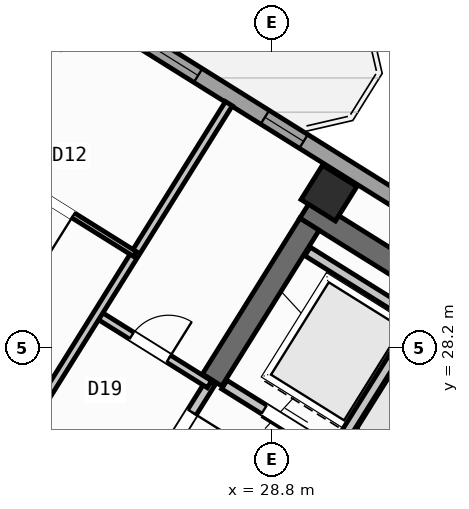
"""IFC4 building model, lengths in metres.
Left out: names, types, materials, properties, quantities, classifications, styles, units other than length and angle.
Written with IfcOpenShell. Run it as: python <this file> out.ifc"""

import sys

from ifc_helpers import new_model, si_unit, direction, frame, frame_2d, origin, origin_2d, place, context, subcontext, project, spatial, rectangle, hollow_rectangle, extrude, source, transform, mapped, element, fill, save


model = new_model("IFC4")
c1 = context("Model", 3, precision=1e-05, world=origin(), true_north=direction((0.0, 1.0)))
c2 = subcontext(c1, "Body", "Model", "MODEL_VIEW")
j1 = project(units=[si_unit("LENGTHUNIT", "METRE"), si_unit("PLANEANGLEUNIT", "RADIAN")], contexts=[c1])
p1 = place(None, origin())
s1 = spatial("IfcSite", under=j1, at=p1, CompositionType="ELEMENT")
p2 = place(p1, origin())
s2 = spatial("IfcBuilding", under=s1, at=p2, CompositionType="ELEMENT")
p3 = place(p2, frame((0.0, 0.0, 242.1)))
s3 = spatial("IfcBuildingStorey", under=s2, at=p3, CompositionType="ELEMENT", Elevation=242.1)
p4 = place(p3, frame((40.531, 24.036, 0.0), z_axis=(0.0, 0.0, 1.0), x_axis=(-0.848048787466, 0.529918157905, 0.0)))
e1 = element("IfcWall", 1, at=p4, inside=s3, PredefinedType="SHEAR", context=c2, shape_type="SweptSolid", body=[
    extrude(rectangle(XDim=13.04, YDim=0.45, at=frame_2d((6.52, 0.0))), origin(), (0.0, 0.0, 1.0), 3.32),
])
p5 = place(p3, frame((29.544, 30.636, 0.0), z_axis=(0.0, 0.0, 1.0), x_axis=(-0.529902075036, -0.848058836916, 0.0)))
e2 = element("IfcWall", 2, at=p5, inside=s3, PredefinedType="SHEAR", context=c2, shape_type="SweptSolid", body=[
    extrude(rectangle(XDim=3.625, YDim=0.45, at=frame_2d((1.812, 0.0))), origin(), (0.0, 0.0, 1.0), 3.32),
])
m1 = source(origin(), c2, "Body", "SweptSolid", [
    extrude(hollow_rectangle(XDim=0.8, YDim=0.8, WallThickness=0.032, at=origin_2d()), origin(), (0.0, 0.0, 1.0), 3.6),
])
p6 = place(p3, frame((29.928, 31.251, 0.0), z_axis=(0.0, 0.0, 1.0), x_axis=(-0.848048096156, 0.529919264233, 0.0)))
e3 = element("IfcColumn", 3, at=p6, inside=s3, PredefinedType="COLUMN", context=c2, shape_type="MappedRepresentation", body=[
    mapped(m1, transform((0.0, 0.0, 0.0), scale=1.0)),
])
p7 = place(p3, frame((14.138, 41.825, 0.0), z_axis=(0.0, 0.0, 1.0), x_axis=(0.848046498049, -0.529921821731, 0.0)))
e4 = element("IfcWall", 4, at=p7, inside=s3, PredefinedType="STANDARD", context=c2, shape_type="SweptSolid", body=[
    extrude(rectangle(XDim=31.588, YDim=0.32, at=frame_2d((15.794, 0.0))), origin(), (0.0, 0.0, 1.0), 3.32),
])
p8 = place(p7, frame((9.712, 0.0, 0.0)))
e5 = element("IfcOpeningElement", 5, at=p8, cuts=e4, PredefinedType="OPENING", context=c2, shape_type="SweptSolid", body=[
    extrude(rectangle(XDim=1.05, YDim=2.15, at=frame_2d((0.525, 1.075))), frame((0.0, 0.17, 0.0), z_axis=(0.0, -1.0, 0.0), x_axis=(1.0, 0.0, 0.0)), (0.0, 0.0, 1.0), 0.34),
])
p9 = place(p7, frame((0.841, 0.0, 0.9)))
e6 = element("IfcOpeningElement", 6, at=p9, cuts=e4, PredefinedType="OPENING", context=c2, shape_type="SweptSolid", body=[
    extrude(rectangle(XDim=1.65, YDim=1.45, at=frame_2d((0.825, 0.725))), frame((0.0, 0.17, 0.0), z_axis=(0.0, -1.0, 0.0), x_axis=(1.0, 0.0, 0.0)), (0.0, 0.0, 1.0), 0.34),
])
p10 = place(p7, frame((4.171, 0.0, 1.0)))
e7 = element("IfcOpeningElement", 7, at=p10, cuts=e4, PredefinedType="OPENING", context=c2, shape_type="SweptSolid", body=[
    extrude(rectangle(XDim=0.9, YDim=1.25, at=frame_2d((0.45, 0.625))), frame((0.0, 0.17, 0.0), z_axis=(0.0, -1.0, 0.0), x_axis=(1.0, 0.0, 0.0)), (0.0, 0.0, 1.0), 0.34),
])
p11 = place(p7, frame((13.624, 0.0, 0.95)))
e8 = element("IfcOpeningElement", 8, at=p11, cuts=e4, PredefinedType="OPENING", context=c2, shape_type="SweptSolid", body=[
    extrude(rectangle(XDim=1.95, YDim=1.35, at=frame_2d((0.975, 0.675))), frame((0.0, 0.17, 0.0), z_axis=(0.0, -1.0, 0.0), x_axis=(1.0, 0.0, 0.0)), (0.0, 0.0, 1.0), 0.34),
])
p12 = place(p7, frame((17.129, 0.0, 1.0)))
e9 = element("IfcOpeningElement", 9, at=p12, cuts=e4, PredefinedType="OPENING", context=c2, shape_type="SweptSolid", body=[
    extrude(rectangle(XDim=0.9, YDim=1.25, at=frame_2d((0.45, 0.625))), frame((0.0, 0.17, 0.0), z_axis=(0.0, -1.0, 0.0), x_axis=(1.0, 0.0, 0.0)), (0.0, 0.0, 1.0), 0.34),
])
p13 = place(p7, frame((21.744, 0.0, 0.9)))
e10 = element("IfcOpeningElement", 10, at=p13, cuts=e4, PredefinedType="OPENING", context=c2, shape_type="SweptSolid", body=[
    extrude(rectangle(XDim=1.65, YDim=1.45, at=frame_2d((0.825, 0.725))), frame((0.0, 0.17, 0.0), z_axis=(0.0, -1.0, 0.0), x_axis=(1.0, 0.0, 0.0)), (0.0, 0.0, 1.0), 0.34),
])
p14 = place(p7, frame((27.394, 0.0, 0.9)))
e11 = element("IfcOpeningElement", 11, at=p14, cuts=e4, PredefinedType="OPENING", context=c2, shape_type="SweptSolid", body=[
    extrude(rectangle(XDim=1.65, YDim=1.45, at=frame_2d((0.825, 0.725))), frame((0.0, 0.17, 0.0), z_axis=(0.0, -1.0, 0.0), x_axis=(1.0, 0.0, 0.0)), (0.0, 0.0, 1.0), 0.34),
])
p15 = place(p3, frame((31.822, 24.998, 0.0), z_axis=(0.0, 0.0, 1.0), x_axis=(-0.848054125777, 0.529909614701, 0.0)))
e12 = element("IfcWall", 12, at=p15, inside=s3, PredefinedType="STANDARD", context=c2, shape_type="SweptSolid", body=[
    extrude(rectangle(XDim=4.668, YDim=0.2, at=frame_2d((2.334, 0.0))), origin(), (0.0, 0.0, 1.0), 3.31),
])
p16 = place(p15, frame((0.52, 0.0, 0.0)))
e13 = element("IfcOpeningElement", 13, at=p16, cuts=e12, PredefinedType="OPENING", context=c2, shape_type="SweptSolid", body=[
    extrude(rectangle(XDim=1.2, YDim=2.15, at=frame_2d((0.6, 1.075))), frame((0.0, 0.11, 0.0), z_axis=(0.0, -1.0, 0.0), x_axis=(1.0, 0.0, 0.0)), (0.0, 0.0, 1.0), 0.22),
])
p17 = place(p15, frame((2.54, 0.0, 0.0)))
e14 = element("IfcOpeningElement", 14, at=p17, cuts=e12, PredefinedType="OPENING", context=c2, shape_type="SweptSolid", body=[
    extrude(rectangle(XDim=1.2, YDim=2.15, at=frame_2d((0.6, 1.075))), frame((0.0, 0.11, 0.0), z_axis=(0.0, -1.0, 0.0), x_axis=(1.0, 0.0, 0.0)), (0.0, 0.0, 1.0), 0.22),
])
p18 = place(p3, frame((31.645, 28.716, 0.0), z_axis=(0.0, 0.0, 1.0), x_axis=(-0.52986693015, -0.848080795876, 0.0)))
e15 = element("IfcWall", 15, at=p18, inside=s3, PredefinedType="STANDARD", context=c2, shape_type="SweptSolid", body=[
    extrude(rectangle(XDim=2.66, YDim=0.2, at=frame_2d((1.33, 0.0))), origin(), (0.0, 0.0, 1.0), 3.31),
])
p19 = place(p3, frame((33.363, 27.69, 0.0), z_axis=(0.0, 0.0, 1.0), x_axis=(-0.84804957148, 0.529916903215, 0.0)))
e16 = element("IfcWall", 16, at=p19, inside=s3, PredefinedType="STANDARD", context=c2, shape_type="SweptSolid", body=[
    extrude(rectangle(XDim=4.548, YDim=0.2, at=frame_2d((2.274, 0.0))), origin(), (0.0, 0.0, 1.0), 3.31),
])
p20 = place(p3, frame((27.596, 27.52, 0.0), z_axis=(0.0, 0.0, 1.0), x_axis=(-0.529865479138, -0.848081702443, 0.0)))
e17 = element("IfcWall", 17, at=p20, inside=s3, PredefinedType="STANDARD", context=c2, shape_type="SweptSolid", body=[
    extrude(rectangle(XDim=2.96, YDim=0.2, at=frame_2d((1.48, 0.0))), origin(), (0.0, 0.0, 1.0), 3.31),
])
p21 = place(p20, frame((0.7, 0.0, 0.0)))
e18 = element("IfcOpeningElement", 18, at=p21, cuts=e17, PredefinedType="OPENING", context=c2, shape_type="SweptSolid", body=[
    extrude(rectangle(XDim=1.5, YDim=2.15, at=frame_2d((0.75, 1.075))), frame((0.0, 0.11, 0.0), z_axis=(0.0, -1.0, 0.0), x_axis=(1.0, 0.0, 0.0)), (0.0, 0.0, 1.0), 0.22),
])
p22 = place(p3, frame((27.57, 27.478, 0.0), z_axis=(0.0, 0.0, 1.0), x_axis=(-0.848050851465, 0.529914854792, 0.0)))
e19 = element("IfcWall", 19, at=p22, inside=s3, PredefinedType="PARTITIONING", context=c2, shape_type="SweptSolid", body=[
    extrude(rectangle(XDim=2.61, YDim=0.16, at=frame_2d((1.305, 0.0))), origin(), (0.0, 0.0, 1.0), 3.31),
])
p23 = place(p22, frame((0.95, 0.0, 0.0)))
e20 = element("IfcOpeningElement", 20, at=p23, cuts=e19, PredefinedType="OPENING", context=c2, shape_type="SweptSolid", body=[
    extrude(rectangle(XDim=0.86, YDim=2.05, at=frame_2d((0.43, 1.025))), frame((0.0, 0.09, 0.0), z_axis=(0.0, -1.0, 0.0), x_axis=(1.0, 0.0, 0.0)), (0.0, 0.0, 1.0), 0.18),
])
p24 = place(p3, frame((27.953, 33.016, 0.0), z_axis=(0.0, 0.0, 1.0), x_axis=(-0.529903001606, -0.848058257957, 0.0)))
e21 = element("IfcWall", 21, at=p24, inside=s3, PredefinedType="PARTITIONING", context=c2, shape_type="SweptSolid", body=[
    extrude(rectangle(XDim=9.15, YDim=0.16, at=frame_2d((4.575, 0.0))), origin(), (0.0, 0.0, 1.0), 3.31),
])
p25 = place(p3, frame((26.099, 30.05, 0.0), z_axis=(0.0, 0.0, 1.0), x_axis=(-0.84803087207, 0.529946827537, 0.0)))
e22 = element("IfcWall", 22, at=p25, inside=s3, PredefinedType="PARTITIONING", context=c2, shape_type="SweptSolid", body=[
    extrude(rectangle(XDim=3.79, YDim=0.11, at=frame_2d((1.895, 0.0))), origin(), (0.0, 0.0, 1.0), 3.31),
])
p26 = place(p25, frame((1.435, 0.0, 0.0)))
e23 = element("IfcOpeningElement", 23, at=p26, cuts=e22, PredefinedType="OPENING", context=c2, shape_type="SweptSolid", body=[
    extrude(rectangle(XDim=0.92, YDim=2.08, at=frame_2d((0.46, 1.04))), frame((0.0, 0.065, 0.0), z_axis=(0.0, -1.0, 0.0), x_axis=(1.0, 0.0, 0.0)), (0.0, 0.0, 1.0), 0.13),
])
m2 = source(origin(), c2, "Body", "SweptSolid", [
    extrude(rectangle(XDim=1.95, YDim=1.35, at=frame_2d((0.975, 0.675))), frame((0.0, 0.03, 0.0), z_axis=(0.0, -1.0, 0.0), x_axis=(1.0, 0.0, 0.0)), (0.0, 0.0, 1.0), 0.06),
])
p27 = place(p11, origin())
e24 = element("IfcWindow", 24, at=p27, inside=s3, PartitioningType="SINGLE_PANEL", PredefinedType="WINDOW", context=c2, shape_type="MappedRepresentation", body=[
    mapped(m2, transform((0.0, 0.0, 0.0), scale=1.0)),
])
fill(e8, e24)
m3 = source(origin(), c2, "Body", "SweptSolid", [
    extrude(rectangle(XDim=0.9, YDim=1.25, at=frame_2d((0.45, 0.625))), frame((0.0, 0.03, 0.0), z_axis=(0.0, -1.0, 0.0), x_axis=(1.0, 0.0, 0.0)), (0.0, 0.0, 1.0), 0.06),
])
p28 = place(p12, origin())
e25 = element("IfcWindow", 25, at=p28, inside=s3, PartitioningType="SINGLE_PANEL", PredefinedType="WINDOW", context=c2, shape_type="MappedRepresentation", body=[
    mapped(m3, transform((0.0, 0.0, 0.0), scale=1.0)),
])
fill(e9, e25)
m4 = source(origin(), c2, "Body", "SweptSolid", [
    extrude(rectangle(XDim=1.2, YDim=2.15, at=frame_2d((0.6, 1.075))), frame((0.0, 0.025, 0.0), z_axis=(0.0, -1.0, 0.0), x_axis=(1.0, 0.0, 0.0)), (0.0, 0.0, 1.0), 0.05),
])
p29 = place(p17, origin())
e26 = element("IfcDoor", 26, at=p29, inside=s3, OperationType="DOUBLE_DOOR_SLIDING", PredefinedType="DOOR", context=c2, shape_type="MappedRepresentation", body=[
    mapped(m4, transform((0.0, 0.0, 0.0), scale=1.0)),
])
fill(e14, e26)
m5 = source(origin(), c2, "Body", "SweptSolid", [
    extrude(rectangle(XDim=0.86, YDim=2.05, at=frame_2d((0.43, 1.025))), frame((0.0, 0.025, 0.0), z_axis=(0.0, -1.0, 0.0), x_axis=(1.0, 0.0, 0.0)), (0.0, 0.0, 1.0), 0.05),
])
p30 = place(p23, frame((0.86, 0.0, 0.0), z_axis=(0.0, 0.0, 1.0), x_axis=(-1.0, 0.0, 0.0)))
e27 = element("IfcDoor", 27, at=p30, inside=s3, OperationType="SINGLE_SWING_RIGHT", PredefinedType="DOOR", context=c2, shape_type="MappedRepresentation", body=[
    mapped(m5, transform((0.0, 0.0, 0.0), scale=1.0)),
])
fill(e20, e27)
m6 = source(origin(), c2, "Body", "SweptSolid", [
    extrude(rectangle(XDim=1.5, YDim=2.15, at=frame_2d((0.75, 1.075))), frame((0.0, 0.025, 0.0), z_axis=(0.0, -1.0, 0.0), x_axis=(1.0, 0.0, 0.0)), (0.0, 0.0, 1.0), 0.05),
])
p31 = place(p21, origin())
e28 = element("IfcDoor", 28, at=p31, inside=s3, OperationType="DOUBLE_DOOR_SINGLE_SWING", PredefinedType="DOOR", context=c2, shape_type="MappedRepresentation", body=[
    mapped(m6, transform((0.0, 0.0, 0.0), scale=1.0)),
])
fill(e18, e28)
m7 = source(origin(), c2, "Body", "SweptSolid", [
    extrude(rectangle(XDim=0.92, YDim=2.08, at=frame_2d((0.46, 1.04))), frame((0.0, 0.025, 0.0), z_axis=(0.0, -1.0, 0.0), x_axis=(1.0, 0.0, 0.0)), (0.0, 0.0, 1.0), 0.05),
])
p32 = place(p26, origin())
e29 = element("IfcDoor", 29, at=p32, inside=s3, OperationType="SINGLE_SWING_LEFT", PredefinedType="DOOR", context=c2, shape_type="MappedRepresentation", body=[
    mapped(m7, transform((0.0, 0.0, 0.0), scale=1.0)),
])
fill(e23, e29)
save(model, sys.argv[1])
